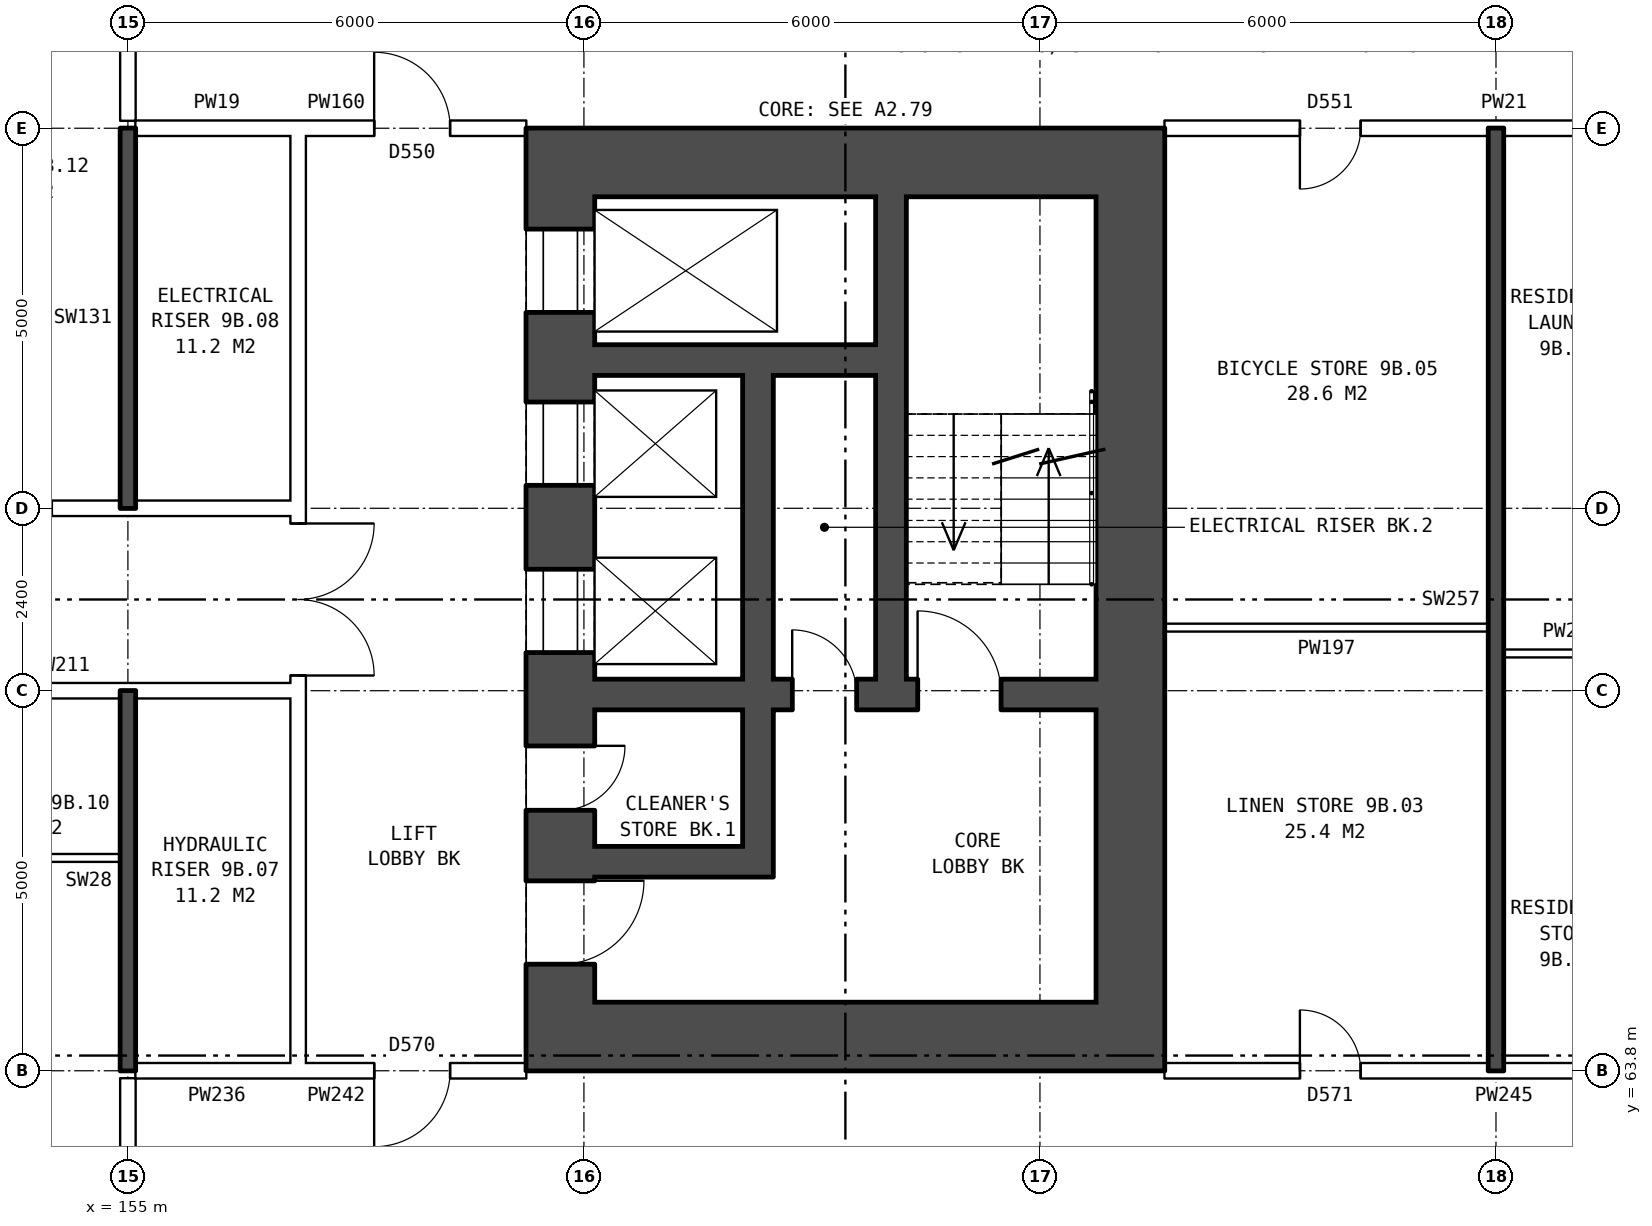
"""IFC4 building model, lengths in metres.
Left out: names, types, materials, properties, quantities, classifications, styles, units other than length and angle.
Written with IfcOpenShell. Run it as: python <this file> out.ifc"""

import sys

from ifc_helpers import new_model, si_unit, direction, frame, frame_2d, origin, place, context, subcontext, project, spatial, rectangle, extrude, element, fill, save


model = new_model("IFC4")
c1 = context("Model", 3, precision=1e-05, world=origin(), true_north=direction((0.0, 1.0)))
c2 = subcontext(c1, "Body", "Model", "MODEL_VIEW")
j1 = project(units=[si_unit("LENGTHUNIT", "METRE"), si_unit("PLANEANGLEUNIT", "RADIAN")], contexts=[c1])
p1 = place(None, origin())
s1 = spatial("IfcSite", under=j1, at=p1, CompositionType="ELEMENT")
p2 = place(p1, origin())
s2 = spatial("IfcBuilding", under=s1, at=p2, CompositionType="ELEMENT")
p3 = place(p2, frame((0.0, 0.0, 35.0)))
s3 = spatial("IfcBuildingStorey", under=s2, at=p3, CompositionType="ELEMENT", Elevation=35.0)
p4 = place(p3, frame((160.69, 75.3, 0.0), z_axis=(0.0, 0.0, 1.0), x_axis=(0.0, -1.0, 0.0)))
e1 = element("IfcWall", 1, at=p4, inside=s3, PredefinedType="SHEAR", context=c2, shape_type="SweptSolid", body=[
    extrude(rectangle(XDim=10.6, YDim=0.9, at=frame_2d((5.3, 0.0))), origin(), (0.0, 0.0, 1.0), 2.85),
])
p5 = place(p4, frame((0.425, 0.0, 0.0)))
e2 = element("IfcOpeningElement", 2, at=p5, cuts=e1, PredefinedType="OPENING", context=c2, shape_type="SweptSolid", body=[
    extrude(rectangle(XDim=1.1, YDim=2.1, at=frame_2d((0.55, 1.05))), frame((0.0, 0.46, 0.0), z_axis=(0.0, -1.0, 0.0), x_axis=(1.0, 0.0, 0.0)), (0.0, 0.0, 1.0), 0.92),
])
p6 = place(p4, frame((2.7, 0.0, 0.0)))
e3 = element("IfcOpeningElement", 3, at=p6, cuts=e1, PredefinedType="OPENING", context=c2, shape_type="SweptSolid", body=[
    extrude(rectangle(XDim=1.1, YDim=2.1, at=frame_2d((0.55, 1.05))), frame((0.0, 0.46, 0.0), z_axis=(0.0, -1.0, 0.0), x_axis=(1.0, 0.0, 0.0)), (0.0, 0.0, 1.0), 0.92),
])
p7 = place(p4, frame((4.9, 0.0, 0.0)))
e4 = element("IfcOpeningElement", 4, at=p7, cuts=e1, PredefinedType="OPENING", context=c2, shape_type="SweptSolid", body=[
    extrude(rectangle(XDim=1.1, YDim=2.1, at=frame_2d((0.55, 1.05))), frame((0.0, 0.46, 0.0), z_axis=(0.0, -1.0, 0.0), x_axis=(1.0, 0.0, 0.0)), (0.0, 0.0, 1.0), 0.92),
])
p8 = place(p4, frame((9.0, 0.0, 0.0)))
e5 = element("IfcOpeningElement", 5, at=p8, cuts=e1, PredefinedType="OPENING", context=c2, shape_type="SweptSolid", body=[
    extrude(rectangle(XDim=1.1, YDim=2.1, at=frame_2d((0.55, 1.05))), frame((0.0, 0.46, 0.0), z_axis=(0.0, -1.0, 0.0), x_axis=(1.0, 0.0, 0.0)), (0.0, 0.0, 1.0), 0.92),
])
p9 = place(p4, frame((7.225, 0.0, 0.0)))
e6 = element("IfcOpeningElement", 6, at=p9, cuts=e1, PredefinedType="OPENING", context=c2, shape_type="SweptSolid", body=[
    extrude(rectangle(XDim=0.85, YDim=2.1, at=frame_2d((0.425, 1.05))), frame((0.0, 0.46, 0.0), z_axis=(0.0, -1.0, 0.0), x_axis=(1.0, 0.0, 0.0)), (0.0, 0.0, 1.0), 0.92),
])
p10 = place(p3, frame((168.19, 75.3, 0.0), z_axis=(0.0, 0.0, 1.0), x_axis=(0.0, -1.0, 0.0)))
e7 = element("IfcWall", 7, at=p10, inside=s3, PredefinedType="SHEAR", context=c2, shape_type="SweptSolid", body=[
    extrude(rectangle(XDim=10.6, YDim=0.9, at=frame_2d((5.3, 0.0))), origin(), (0.0, 0.0, 1.0), 2.85),
])
for number, where, z_axis, x_axis in (
    (8, (160.24, 75.75, 0.0), (0.0, 0.0, 1.0), (1.0, 0.0, 0.0)),
    (9, (160.24, 64.25, 0.0), (0.0, 0.0, 1.0), (1.0, 0.0, 0.0)),
):
    element("IfcWall", number, at=place(p3, frame(where, z_axis=z_axis, x_axis=x_axis)), inside=s3, PredefinedType="SHEAR", context=c2, shape_type="SweptSolid", body=[
        extrude(rectangle(XDim=8.4, YDim=0.9, at=frame_2d((4.2, 0.0))), origin(), (0.0, 0.0, 1.0), 2.85),
    ])
p11 = place(p3, frame((161.14, 73.15, 0.0), z_axis=(0.0, 0.0, 1.0), x_axis=(1.0, 0.0, 0.0)))
e10 = element("IfcWall", 10, at=p11, inside=s3, PredefinedType="SHEAR", context=c2, shape_type="SweptSolid", body=[
    extrude(rectangle(XDim=3.7, YDim=0.4, at=frame_2d((1.85, 0.0))), origin(), (0.0, 0.0, 1.0), 2.85),
])
p12 = place(p3, frame((161.14, 68.75, 0.0), z_axis=(0.0, 0.0, 1.0), x_axis=(1.0, 0.0, 0.0)))
e11 = element("IfcWall", 11, at=p12, inside=s3, PredefinedType="SHEAR", context=c2, shape_type="SweptSolid", body=[
    extrude(rectangle(XDim=6.6, YDim=0.4, at=frame_2d((3.3, 0.0))), origin(), (0.0, 0.0, 1.0), 2.85),
])
p13 = place(p12, frame((4.25, 0.0, 0.0)))
e12 = element("IfcOpeningElement", 12, at=p13, cuts=e11, PredefinedType="OPENING", context=c2, shape_type="SweptSolid", body=[
    extrude(rectangle(XDim=1.1, YDim=2.1, at=frame_2d((0.55, 1.05))), frame((0.0, 0.21, 0.0), z_axis=(0.0, -1.0, 0.0), x_axis=(1.0, 0.0, 0.0)), (0.0, 0.0, 1.0), 0.42),
])
p14 = place(p12, frame((2.6, 0.0, 0.0)))
e13 = element("IfcOpeningElement", 13, at=p14, cuts=e11, PredefinedType="OPENING", context=c2, shape_type="SweptSolid", body=[
    extrude(rectangle(XDim=0.85, YDim=2.1, at=frame_2d((0.425, 1.05))), frame((0.0, 0.21, 0.0), z_axis=(0.0, -1.0, 0.0), x_axis=(1.0, 0.0, 0.0)), (0.0, 0.0, 1.0), 0.42),
])
p15 = place(p3, frame((161.14, 66.55, 0.0), z_axis=(0.0, 0.0, 1.0), x_axis=(1.0, 0.0, 0.0)))
e14 = element("IfcWall", 14, at=p15, inside=s3, PredefinedType="SHEAR", context=c2, shape_type="SweptSolid", body=[
    extrude(rectangle(XDim=1.95, YDim=0.4, at=frame_2d((0.975, 0.0))), origin(), (0.0, 0.0, 1.0), 2.85),
])
p16 = place(p3, frame((163.29, 72.95, 0.0), z_axis=(0.0, 0.0, 1.0), x_axis=(0.0, -1.0, 0.0)))
e15 = element("IfcWall", 15, at=p16, inside=s3, PredefinedType="SHEAR", context=c2, shape_type="SweptSolid", body=[
    extrude(rectangle(XDim=4.0, YDim=0.4, at=frame_2d((2.0, 0.0))), origin(), (0.0, 0.0, 1.0), 2.85),
])
p17 = place(p3, frame((163.29, 68.55, 0.0), z_axis=(0.0, 0.0, 1.0), x_axis=(0.0, -1.0, 0.0)))
e16 = element("IfcWall", 16, at=p17, inside=s3, PredefinedType="SHEAR", context=c2, shape_type="SweptSolid", body=[
    extrude(rectangle(XDim=2.2, YDim=0.4, at=frame_2d((1.1, 0.0))), origin(), (0.0, 0.0, 1.0), 2.85),
])
p18 = place(p3, frame((165.04, 75.3, 0.0), z_axis=(0.0, 0.0, 1.0), x_axis=(0.0, -1.0, 0.0)))
e17 = element("IfcWall", 17, at=p18, inside=s3, PredefinedType="SHEAR", context=c2, shape_type="SweptSolid", body=[
    extrude(rectangle(XDim=6.35, YDim=0.4, at=frame_2d((3.175, 0.0))), origin(), (0.0, 0.0, 1.0), 2.85),
])
p19 = place(p3, frame((157.24, 63.9, 0.0), z_axis=(0.0, 0.0, 1.0), x_axis=(0.0, 1.0, 0.0)))
e18 = element("IfcWall", 18, at=p19, inside=s3, PredefinedType="PARTITIONING", context=c2, shape_type="SweptSolid", body=[
    extrude(rectangle(XDim=12.2, YDim=0.2, at=frame_2d((6.1, 0.0))), origin(), (0.0, 0.0, 1.0), 2.85),
])
p20 = place(p19, frame((5.1, 0.0, 0.0)))
e19 = element("IfcOpeningElement", 19, at=p20, cuts=e18, PredefinedType="OPENING", context=c2, shape_type="SweptSolid", body=[
    extrude(rectangle(XDim=2.0, YDim=2.1, at=frame_2d((1.0, 1.05))), frame((0.0, 0.11, 0.0), z_axis=(0.0, -1.0, 0.0), x_axis=(1.0, 0.0, 0.0)), (0.0, 0.0, 1.0), 0.22),
])
p21 = place(p3, frame((155.1, 63.8, 0.0), z_axis=(0.0, 0.0, 1.0), x_axis=(1.0, 0.0, 0.0)))
e20 = element("IfcWall", 20, at=p21, inside=s3, PredefinedType="PARTITIONING", context=c2, shape_type="SweptSolid", body=[
    extrude(rectangle(XDim=2.14, YDim=0.2, at=frame_2d((1.07, 0.0))), origin(), (0.0, 0.0, 1.0), 2.85),
])
p22 = place(p3, frame((157.24, 63.8, 0.0), z_axis=(0.0, 0.0, 1.0), x_axis=(1.0, 0.0, 0.0)))
e21 = element("IfcWall", 21, at=p22, inside=s3, PredefinedType="PARTITIONING", context=c2, shape_type="SweptSolid", body=[
    extrude(rectangle(XDim=3.0, YDim=0.2, at=frame_2d((1.5, 0.0))), origin(), (0.0, 0.0, 1.0), 2.85),
])
p23 = place(p22, frame((1.0, 0.0, 0.0)))
e22 = element("IfcOpeningElement", 22, at=p23, cuts=e21, PredefinedType="OPENING", context=c2, shape_type="SweptSolid", body=[
    extrude(rectangle(XDim=1.0, YDim=2.1, at=frame_2d((0.5, 1.05))), frame((0.0, 0.11, 0.0), z_axis=(0.0, -1.0, 0.0), x_axis=(1.0, 0.0, 0.0)), (0.0, 0.0, 1.0), 0.22),
])
p24 = place(p3, frame((168.64, 63.8, 0.0), z_axis=(0.0, 0.0, 1.0), x_axis=(1.0, 0.0, 0.0)))
e23 = element("IfcWall", 23, at=p24, inside=s3, PredefinedType="PARTITIONING", context=c2, shape_type="SweptSolid", body=[
    extrude(rectangle(XDim=6.35, YDim=0.2, at=frame_2d((3.175, 0.0))), origin(), (0.0, 0.0, 1.0), 2.85),
])
p25 = place(p24, frame((1.78, 0.0, 0.0)))
e24 = element("IfcOpeningElement", 24, at=p25, cuts=e23, PredefinedType="OPENING", context=c2, shape_type="SweptSolid", body=[
    extrude(rectangle(XDim=0.8, YDim=2.1, at=frame_2d((0.4, 1.05))), frame((0.0, 0.11, 0.0), z_axis=(0.0, -1.0, 0.0), x_axis=(1.0, 0.0, 0.0)), (0.0, 0.0, 1.0), 0.22),
])
p26 = place(p3, frame((152.0, 66.6, 0.0), z_axis=(0.0, 0.0, 1.0), x_axis=(1.0, 0.0, 0.0)))
e25 = element("IfcWall", 25, at=p26, inside=s3, PredefinedType="PARTITIONING", context=c2, shape_type="SweptSolid", body=[
    extrude(rectangle(XDim=2.9, YDim=0.1, at=frame_2d((1.45, 0.0))), origin(), (0.0, 0.0, 1.0), 2.85),
])
p27 = place(p3, frame((142.76, 68.8, 0.0), z_axis=(0.0, 0.0, 1.0), x_axis=(1.0, 0.0, 0.0)))
e26 = element("IfcWall", 26, at=p27, inside=s3, PredefinedType="PARTITIONING", context=c2, shape_type="SweptSolid", body=[
    extrude(rectangle(XDim=14.48, YDim=0.2, at=frame_2d((7.24, 0.0))), origin(), (0.0, 0.0, 1.0), 2.85),
])
p28 = place(p27, frame((1.12, 0.0, 0.0)))
e27 = element("IfcOpeningElement", 27, at=p28, cuts=e26, PredefinedType="OPENING", context=c2, shape_type="SweptSolid", body=[
    extrude(rectangle(XDim=1.0, YDim=2.1, at=frame_2d((0.5, 1.05))), frame((0.0, 0.11, 0.0), z_axis=(0.0, -1.0, 0.0), x_axis=(1.0, 0.0, 0.0)), (0.0, 0.0, 1.0), 0.22),
])
p29 = place(p27, frame((7.24, 0.0, 0.0)))
e28 = element("IfcOpeningElement", 28, at=p29, cuts=e26, PredefinedType="OPENING", context=c2, shape_type="SweptSolid", body=[
    extrude(rectangle(XDim=1.0, YDim=2.1, at=frame_2d((0.5, 1.05))), frame((0.0, 0.11, 0.0), z_axis=(0.0, -1.0, 0.0), x_axis=(1.0, 0.0, 0.0)), (0.0, 0.0, 1.0), 0.22),
])
p30 = place(p3, frame((173.1, 69.29, 0.0), z_axis=(0.0, 0.0, 1.0), x_axis=(1.0, 0.0, 0.0)))
e29 = element("IfcWall", 29, at=p30, inside=s3, PredefinedType="PARTITIONING", context=c2, shape_type="SweptSolid", body=[
    extrude(rectangle(XDim=1.79, YDim=0.1, at=frame_2d((0.895, 0.0))), origin(), (0.0, 0.0, 1.0), 2.85),
])
p31 = place(p3, frame((168.64, 69.63, 0.0), z_axis=(0.0, 0.0, 1.0), x_axis=(1.0, 0.0, 0.0)))
e30 = element("IfcWall", 30, at=p31, inside=s3, PredefinedType="PARTITIONING", context=c2, shape_type="SweptSolid", body=[
    extrude(rectangle(XDim=4.26, YDim=0.1, at=frame_2d((2.13, 0.0))), origin(), (0.0, 0.0, 1.0), 2.85),
])
p32 = place(p3, frame((142.76, 71.2, 0.0), z_axis=(0.0, 0.0, 1.0), x_axis=(1.0, 0.0, 0.0)))
e31 = element("IfcWall", 31, at=p32, inside=s3, PredefinedType="PARTITIONING", context=c2, shape_type="SweptSolid", body=[
    extrude(rectangle(XDim=14.48, YDim=0.2, at=frame_2d((7.24, 0.0))), origin(), (0.0, 0.0, 1.0), 2.85),
])
p33 = place(p32, frame((1.12, 0.0, 0.0)))
e32 = element("IfcOpeningElement", 32, at=p33, cuts=e31, PredefinedType="OPENING", context=c2, shape_type="SweptSolid", body=[
    extrude(rectangle(XDim=1.0, YDim=2.1, at=frame_2d((0.5, 1.05))), frame((0.0, 0.11, 0.0), z_axis=(0.0, -1.0, 0.0), x_axis=(1.0, 0.0, 0.0)), (0.0, 0.0, 1.0), 0.22),
])
p34 = place(p32, frame((10.24, 0.0, 0.0)))
e33 = element("IfcOpeningElement", 33, at=p34, cuts=e31, PredefinedType="OPENING", context=c2, shape_type="SweptSolid", body=[
    extrude(rectangle(XDim=1.0, YDim=2.1, at=frame_2d((0.5, 1.05))), frame((0.0, 0.11, 0.0), z_axis=(0.0, -1.0, 0.0), x_axis=(1.0, 0.0, 0.0)), (0.0, 0.0, 1.0), 0.22),
])
p35 = place(p3, frame((155.1, 76.2, 0.0), z_axis=(0.0, 0.0, 1.0), x_axis=(1.0, 0.0, 0.0)))
e34 = element("IfcWall", 34, at=p35, inside=s3, PredefinedType="PARTITIONING", context=c2, shape_type="SweptSolid", body=[
    extrude(rectangle(XDim=2.14, YDim=0.2, at=frame_2d((1.07, 0.0))), origin(), (0.0, 0.0, 1.0), 2.85),
])
p36 = place(p3, frame((157.24, 76.2, 0.0), z_axis=(0.0, 0.0, 1.0), x_axis=(1.0, 0.0, 0.0)))
e35 = element("IfcWall", 35, at=p36, inside=s3, PredefinedType="PARTITIONING", context=c2, shape_type="SweptSolid", body=[
    extrude(rectangle(XDim=3.0, YDim=0.2, at=frame_2d((1.5, 0.0))), origin(), (0.0, 0.0, 1.0), 2.85),
])
p37 = place(p36, frame((1.0, 0.0, 0.0)))
e36 = element("IfcOpeningElement", 36, at=p37, cuts=e35, PredefinedType="OPENING", context=c2, shape_type="SweptSolid", body=[
    extrude(rectangle(XDim=1.0, YDim=2.1, at=frame_2d((0.5, 1.05))), frame((0.0, 0.11, 0.0), z_axis=(0.0, -1.0, 0.0), x_axis=(1.0, 0.0, 0.0)), (0.0, 0.0, 1.0), 0.22),
])
p38 = place(p3, frame((168.64, 76.2, 0.0), z_axis=(0.0, 0.0, 1.0), x_axis=(1.0, 0.0, 0.0)))
e37 = element("IfcWall", 37, at=p38, inside=s3, PredefinedType="PARTITIONING", context=c2, shape_type="SweptSolid", body=[
    extrude(rectangle(XDim=6.35, YDim=0.2, at=frame_2d((3.175, 0.0))), origin(), (0.0, 0.0, 1.0), 2.85),
])
p39 = place(p38, frame((1.78, 0.0, 0.0)))
e38 = element("IfcOpeningElement", 38, at=p39, cuts=e37, PredefinedType="OPENING", context=c2, shape_type="SweptSolid", body=[
    extrude(rectangle(XDim=0.8, YDim=2.1, at=frame_2d((0.4, 1.05))), frame((0.0, 0.11, 0.0), z_axis=(0.0, -1.0, 0.0), x_axis=(1.0, 0.0, 0.0)), (0.0, 0.0, 1.0), 0.22),
])
p40 = place(p3, frame((155.0, 61.5, 0.0), z_axis=(0.0, 0.0, 1.0), x_axis=(0.0, 1.0, 0.0)))
e39 = element("IfcWall", 39, at=p40, inside=s3, PredefinedType="PARTITIONING", context=c2, shape_type="SweptSolid", body=[
    extrude(rectangle(XDim=2.2, YDim=0.2, at=frame_2d((1.1, 0.0))), origin(), (0.0, 0.0, 1.0), 2.85),
])
for number, where, z_axis, x_axis in (
    (40, (155.0, 63.8, 0.0), (0.0, 0.0, 1.0), (0.0, 1.0, 0.0)),
    (41, (155.0, 71.2, 0.0), (0.0, 0.0, 1.0), (0.0, 1.0, 0.0)),
):
    element("IfcWall", number, at=place(p3, frame(where, z_axis=z_axis, x_axis=x_axis)), inside=s3, PredefinedType="SOLIDWALL", context=c2, shape_type="SweptSolid", body=[
        extrude(rectangle(XDim=5.0, YDim=0.2, at=frame_2d((2.5, 0.0))), origin(), (0.0, 0.0, 1.0), 2.85),
    ])
p41 = place(p3, frame((155.0, 76.3, 0.0), z_axis=(0.0, 0.0, 1.0), x_axis=(0.0, 1.0, 0.0)))
e42 = element("IfcWall", 42, at=p41, inside=s3, PredefinedType="PARTITIONING", context=c2, shape_type="SweptSolid", body=[
    extrude(rectangle(XDim=2.2, YDim=0.2, at=frame_2d((1.1, 0.0))), origin(), (0.0, 0.0, 1.0), 2.85),
])
p42 = place(p3, frame((173.0, 63.8, 0.0), z_axis=(0.0, 0.0, 1.0), x_axis=(0.0, 1.0, 0.0)))
e43 = element("IfcWall", 43, at=p42, inside=s3, PredefinedType="SOLIDWALL", context=c2, shape_type="SweptSolid", body=[
    extrude(rectangle(XDim=12.4, YDim=0.2, at=frame_2d((6.2, 0.0))), origin(), (0.0, 0.0, 1.0), 2.85),
])
p43 = place(p5, origin())
e44 = element("IfcDoor", 44, at=p43, inside=s3, OperationType="DOUBLE_DOOR_SLIDING", PredefinedType="DOOR", context=c2, shape_type="SweptSolid", body=[
    extrude(rectangle(XDim=1.1, YDim=2.1, at=frame_2d((0.55, 1.05))), frame((0.0, 0.435, 0.0), z_axis=(0.0, -1.0, 0.0), x_axis=(1.0, 0.0, 0.0)), (0.0, 0.0, 1.0), 0.05),
])
fill(e2, e44)
p44 = place(p6, origin())
e45 = element("IfcDoor", 45, at=p44, inside=s3, OperationType="DOUBLE_DOOR_SLIDING", PredefinedType="DOOR", context=c2, shape_type="SweptSolid", body=[
    extrude(rectangle(XDim=1.1, YDim=2.1, at=frame_2d((0.55, 1.05))), frame((0.0, 0.435, 0.0), z_axis=(0.0, -1.0, 0.0), x_axis=(1.0, 0.0, 0.0)), (0.0, 0.0, 1.0), 0.05),
])
fill(e3, e45)
p45 = place(p7, origin())
e46 = element("IfcDoor", 46, at=p45, inside=s3, OperationType="DOUBLE_DOOR_SLIDING", PredefinedType="DOOR", context=c2, shape_type="SweptSolid", body=[
    extrude(rectangle(XDim=1.1, YDim=2.1, at=frame_2d((0.55, 1.05))), frame((0.0, 0.435, 0.0), z_axis=(0.0, -1.0, 0.0), x_axis=(1.0, 0.0, 0.0)), (0.0, 0.0, 1.0), 0.05),
])
fill(e4, e46)
p46 = place(p8, origin())
e47 = element("IfcDoor", 47, at=p46, inside=s3, OperationType="SINGLE_SWING_LEFT", PredefinedType="DOOR", context=c2, shape_type="SweptSolid", body=[
    extrude(rectangle(XDim=1.1, YDim=2.1, at=frame_2d((0.55, 1.05))), frame((0.0, 0.435, 0.0), z_axis=(0.0, -1.0, 0.0), x_axis=(1.0, 0.0, 0.0)), (0.0, 0.0, 1.0), 0.05),
])
fill(e5, e47)
p47 = place(p13, origin())
e48 = element("IfcDoor", 48, at=p47, inside=s3, OperationType="SINGLE_SWING_LEFT", PredefinedType="DOOR", context=c2, shape_type="SweptSolid", body=[
    extrude(rectangle(XDim=1.1, YDim=2.1, at=frame_2d((0.55, 1.05))), frame((0.0, 0.025, 0.0), z_axis=(0.0, -1.0, 0.0), x_axis=(1.0, 0.0, 0.0)), (0.0, 0.0, 1.0), 0.05),
])
fill(e12, e48)
p48 = place(p9, origin())
e49 = element("IfcDoor", 49, at=p48, inside=s3, OperationType="SINGLE_SWING_LEFT", PredefinedType="DOOR", context=c2, shape_type="SweptSolid", body=[
    extrude(rectangle(XDim=0.85, YDim=2.1, at=frame_2d((0.425, 1.05))), frame((0.0, 0.435, 0.0), z_axis=(0.0, -1.0, 0.0), x_axis=(1.0, 0.0, 0.0)), (0.0, 0.0, 1.0), 0.05),
])
fill(e6, e49)
p49 = place(p14, origin())
e50 = element("IfcDoor", 50, at=p49, inside=s3, OperationType="SINGLE_SWING_LEFT", PredefinedType="DOOR", context=c2, shape_type="SweptSolid", body=[
    extrude(rectangle(XDim=0.85, YDim=2.1, at=frame_2d((0.425, 1.05))), frame((0.0, 0.025, 0.0), z_axis=(0.0, -1.0, 0.0), x_axis=(1.0, 0.0, 0.0)), (0.0, 0.0, 1.0), 0.05),
])
fill(e13, e50)
p50 = place(p20, frame((2.0, 0.0, 0.0), z_axis=(0.0, 0.0, 1.0), x_axis=(-1.0, 0.0, 0.0)))
e51 = element("IfcDoor", 51, at=p50, inside=s3, OperationType="DOUBLE_DOOR_SINGLE_SWING", PredefinedType="DOOR", context=c2, shape_type="SweptSolid", body=[
    extrude(rectangle(XDim=2.0, YDim=2.1, at=frame_2d((1.0, 1.05))), frame((0.0, 0.025, 0.0), z_axis=(0.0, -1.0, 0.0), x_axis=(1.0, 0.0, 0.0)), (0.0, 0.0, 1.0), 0.05),
])
fill(e19, e51)
p51 = place(p23, frame((1.0, 0.0, 0.0), z_axis=(0.0, 0.0, 1.0), x_axis=(-1.0, 0.0, 0.0)))
e52 = element("IfcDoor", 52, at=p51, inside=s3, OperationType="SINGLE_SWING_RIGHT", PredefinedType="DOOR", context=c2, shape_type="SweptSolid", body=[
    extrude(rectangle(XDim=1.0, YDim=2.1, at=frame_2d((0.5, 1.05))), frame((0.0, 0.025, 0.0), z_axis=(0.0, -1.0, 0.0), x_axis=(1.0, 0.0, 0.0)), (0.0, 0.0, 1.0), 0.05),
])
fill(e22, e52)
p52 = place(p37, origin())
e53 = element("IfcDoor", 53, at=p52, inside=s3, OperationType="SINGLE_SWING_LEFT", PredefinedType="DOOR", context=c2, shape_type="SweptSolid", body=[
    extrude(rectangle(XDim=1.0, YDim=2.1, at=frame_2d((0.5, 1.05))), frame((0.0, 0.025, 0.0), z_axis=(0.0, -1.0, 0.0), x_axis=(1.0, 0.0, 0.0)), (0.0, 0.0, 1.0), 0.05),
])
fill(e36, e53)
p53 = place(p25, origin())
e54 = element("IfcDoor", 54, at=p53, inside=s3, OperationType="SINGLE_SWING_LEFT", PredefinedType="DOOR", context=c2, shape_type="SweptSolid", body=[
    extrude(rectangle(XDim=0.8, YDim=2.1, at=frame_2d((0.4, 1.05))), frame((0.0, 0.025, 0.0), z_axis=(0.0, -1.0, 0.0), x_axis=(1.0, 0.0, 0.0)), (0.0, 0.0, 1.0), 0.05),
])
fill(e24, e54)
p54 = place(p39, frame((0.8, 0.0, 0.0), z_axis=(0.0, 0.0, 1.0), x_axis=(-1.0, 0.0, 0.0)))
e55 = element("IfcDoor", 55, at=p54, inside=s3, OperationType="SINGLE_SWING_RIGHT", PredefinedType="DOOR", context=c2, shape_type="SweptSolid", body=[
    extrude(rectangle(XDim=0.8, YDim=2.1, at=frame_2d((0.4, 1.05))), frame((0.0, 0.025, 0.0), z_axis=(0.0, -1.0, 0.0), x_axis=(1.0, 0.0, 0.0)), (0.0, 0.0, 1.0), 0.05),
])
fill(e38, e55)
save(model, sys.argv[1])
